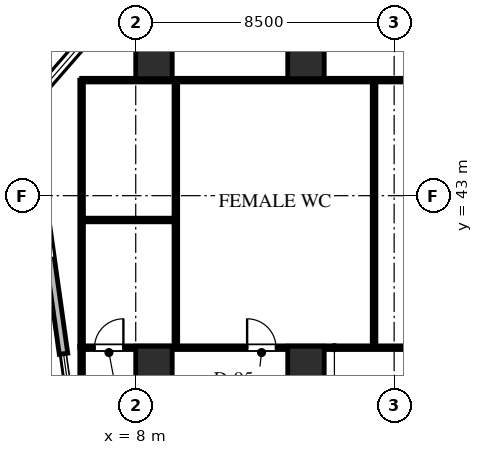
"""IFC4 building model, lengths in metres.
Left out: names, types, materials, properties, quantities, classifications, styles, units other than length and angle.
Written with IfcOpenShell. Run it as: python <this file> out.ifc"""

import sys

from ifc_helpers import new_model, si_unit, direction, frame, frame_2d, origin, origin_2d, place, context, subcontext, project, spatial, rectangle, extrude, element, fill, save


model = new_model("IFC4")
c1 = context("Model", 3, precision=1e-05, world=origin(), true_north=direction((0.0, 1.0)))
c2 = subcontext(c1, "Body", "Model", "MODEL_VIEW")
j1 = project(units=[si_unit("LENGTHUNIT", "METRE"), si_unit("PLANEANGLEUNIT", "RADIAN")], contexts=[c1])
p1 = place(None, origin())
s1 = spatial("IfcSite", under=j1, at=p1, CompositionType="ELEMENT")
p2 = place(p1, origin())
s2 = spatial("IfcBuilding", under=s1, at=p2, CompositionType="ELEMENT")
p3 = place(p2, frame((0.0, 0.0, 37.5)))
s3 = spatial("IfcBuildingStorey", under=s2, at=p3, CompositionType="ELEMENT", Elevation=37.5)
for number, where, z_axis, x_axis in (
    (1, (13.6, 37.35, 0.0), (0.0, 0.0, 1.0), (1.0, 0.0, 0.0)),
    (2, (13.6, 47.55, 0.0), (0.0, 0.0, 1.0), (1.0, 0.0, 0.0)),
    (3, (8.6, 37.35, 0.0), (0.0, 0.0, 1.0), (1.0, 0.0, 0.0)),
    (4, (8.6, 47.55, 0.0), (0.0, 0.0, 1.0), (1.0, 0.0, 0.0)),
):
    element("IfcColumn", number, at=place(p3, frame(where, z_axis=z_axis, x_axis=x_axis)), inside=s3, PredefinedType="COLUMN", context=c2, shape_type="SweptSolid", body=[
        extrude(rectangle(XDim=1.2, YDim=1.4, at=origin_2d()), origin(), (0.0, 0.0, 1.0), 4.0),
    ])
p4 = place(p3, frame((5.625, 37.8, 0.0), z_axis=(0.0, 0.0, 1.0), x_axis=(-0.139180172484, 0.990267074878, 0.0)))
e5 = element("IfcWall", 5, at=p4, inside=s3, PredefinedType="STANDARD", context=c2, shape_type="SweptSolid", body=[
    extrude(rectangle(XDim=8.267, YDim=0.28, at=frame_2d((4.134, 0.0))), origin(), (0.0, 0.0, 1.0), 3.74),
])
p5 = place(p4, frame((3.173, 0.0, 0.65)))
e6 = element("IfcOpeningElement", 6, at=p5, cuts=e5, PredefinedType="OPENING", context=c2, shape_type="SweptSolid", body=[
    extrude(rectangle(XDim=1.8, YDim=2.1, at=frame_2d((0.9, 1.05))), frame((0.0, 0.15, 0.0), z_axis=(0.0, -1.0, 0.0), x_axis=(1.0, 0.0, 0.0)), (0.0, 0.0, 1.0), 0.3),
])
p6 = place(p3, frame((4.474, 45.987, 0.0), z_axis=(0.0, 0.0, 1.0), x_axis=(0.656070053895, 0.754699996278, 0.0)))
e7 = element("IfcWall", 7, at=p6, inside=s3, PredefinedType="STANDARD", context=c2, shape_type="SweptSolid", body=[
    extrude(rectangle(XDim=3.171, YDim=0.28, at=frame_2d((1.585, 0.0))), origin(), (0.0, 0.0, 1.0), 3.74),
])
p7 = place(p6, frame((0.667, 0.0, 0.65)))
e8 = element("IfcOpeningElement", 8, at=p7, cuts=e7, PredefinedType="OPENING", context=c2, shape_type="SweptSolid", body=[
    extrude(rectangle(XDim=1.8, YDim=2.1, at=frame_2d((0.9, 1.05))), frame((0.0, 0.15, 0.0), z_axis=(0.0, -1.0, 0.0), x_axis=(1.0, 0.0, 0.0)), (0.0, 0.0, 1.0), 0.3),
])
p8 = place(p3, frame((6.22, 38.0, 0.0), z_axis=(0.0, 0.0, 1.0), x_axis=(1.0, 0.0, 0.0)))
e9 = element("IfcWall", 9, at=p8, inside=s3, PredefinedType="PARTITIONING", context=c2, shape_type="SweptSolid", body=[
    extrude(rectangle(XDim=16.63, YDim=0.12, at=frame_2d((8.315, 0.0))), origin(), (0.0, 0.0, 1.0), 2.813),
])
p9 = place(p8, frame((0.424, 0.0, 0.0)))
e10 = element("IfcOpeningElement", 10, at=p9, cuts=e9, PredefinedType="OPENING", context=c2, shape_type="SweptSolid", body=[
    extrude(rectangle(XDim=0.95, YDim=2.15, at=frame_2d((0.475, 1.075))), frame((0.0, 0.07, 0.0), z_axis=(0.0, -1.0, 0.0), x_axis=(1.0, 0.0, 0.0)), (0.0, 0.0, 1.0), 0.14),
])
p10 = place(p8, frame((5.444, 0.0, 0.0)))
e11 = element("IfcOpeningElement", 11, at=p10, cuts=e9, PredefinedType="OPENING", context=c2, shape_type="SweptSolid", body=[
    extrude(rectangle(XDim=0.95, YDim=2.15, at=frame_2d((0.475, 1.075))), frame((0.0, 0.07, 0.0), z_axis=(0.0, -1.0, 0.0), x_axis=(1.0, 0.0, 0.0)), (0.0, 0.0, 1.0), 0.14),
])
p11 = place(p8, frame((13.344, 0.0, 0.0)))
e12 = element("IfcOpeningElement", 12, at=p11, cuts=e9, PredefinedType="OPENING", context=c2, shape_type="SweptSolid", body=[
    extrude(rectangle(XDim=0.95, YDim=2.15, at=frame_2d((0.475, 1.075))), frame((0.0, 0.07, 0.0), z_axis=(0.0, -1.0, 0.0), x_axis=(1.0, 0.0, 0.0)), (0.0, 0.0, 1.0), 0.14),
])
p12 = place(p3, frame((6.22, 38.0, 0.0), z_axis=(0.0, 0.0, 1.0), x_axis=(0.0, 1.0, 0.0)))
e13 = element("IfcWall", 13, at=p12, inside=s3, PredefinedType="PARTITIONING", context=c2, shape_type="SweptSolid", body=[
    extrude(rectangle(XDim=8.8, YDim=0.12, at=frame_2d((4.4, 0.0))), origin(), (0.0, 0.0, 1.0), 3.74),
])
p13 = place(p3, frame((6.22, 46.8, 0.0), z_axis=(0.0, 0.0, 1.0), x_axis=(1.0, 0.0, 0.0)))
e14 = element("IfcWall", 14, at=p13, inside=s3, PredefinedType="PARTITIONING", context=c2, shape_type="SweptSolid", body=[
    extrude(rectangle(XDim=16.68, YDim=0.12, at=frame_2d((8.34, 0.0))), origin(), (0.0, 0.0, 1.0), 2.813),
])
for number, where, z_axis, x_axis in (
    (15, (9.32, 38.068, 0.0), (0.0, 0.0, 1.0), (0.0, 1.0, 0.0)),
    (16, (15.84, 38.068, 0.0), (0.0, 0.0, 1.0), (0.0, 1.0, 0.0)),
):
    element("IfcWall", number, at=place(p3, frame(where, z_axis=z_axis, x_axis=x_axis)), inside=s3, PredefinedType="PARTITIONING", context=c2, shape_type="SweptSolid", body=[
        extrude(rectangle(XDim=8.664, YDim=0.12, at=frame_2d((4.332, 0.0))), origin(), (0.0, 0.0, 1.0), 3.74),
    ])
p14 = place(p3, frame((6.288, 42.2, 0.0), z_axis=(0.0, 0.0, 1.0), x_axis=(1.0, 0.0, 0.0)))
e17 = element("IfcWall", 17, at=p14, inside=s3, PredefinedType="PARTITIONING", context=c2, shape_type="SweptSolid", body=[
    extrude(rectangle(XDim=2.964, YDim=0.12, at=frame_2d((1.482, 0.0))), origin(), (0.0, 0.0, 1.0), 2.813),
])
p15 = place(p3, frame((6.22, 34.4, 0.0), z_axis=(0.0, 0.0, 1.0), x_axis=(0.0, 1.0, 0.0)))
e18 = element("IfcWall", 18, at=p15, inside=s3, PredefinedType="PARTITIONING", context=c2, shape_type="SweptSolid", body=[
    extrude(rectangle(XDim=3.65, YDim=0.12, at=frame_2d((1.825, 0.0))), origin(), (0.0, 0.0, 1.0), 3.74),
])
p16 = place(p7, origin())
e19 = element("IfcWindow", 19, at=p16, inside=s3, PartitioningType="SINGLE_PANEL", PredefinedType="WINDOW", context=c2, shape_type="SweptSolid", body=[
    extrude(rectangle(XDim=1.8, YDim=2.1, at=frame_2d((0.9, 1.05))), frame((0.0, 0.03, 0.0), z_axis=(0.0, -1.0, 0.0), x_axis=(1.0, 0.0, 0.0)), (0.0, 0.0, 1.0), 0.06),
])
fill(e8, e19)
p17 = place(p9, origin())
e20 = element("IfcDoor", 20, at=p17, inside=s3, OperationType="SINGLE_SWING_RIGHT", PredefinedType="DOOR", context=c2, shape_type="SweptSolid", body=[
    extrude(rectangle(XDim=0.95, YDim=2.15, at=frame_2d((0.475, 1.075))), frame((0.0, 0.025, 0.0), z_axis=(0.0, -1.0, 0.0), x_axis=(1.0, 0.0, 0.0)), (0.0, 0.0, 1.0), 0.05),
])
fill(e10, e20)
p18 = place(p10, origin())
e21 = element("IfcDoor", 21, at=p18, inside=s3, OperationType="SINGLE_SWING_LEFT", PredefinedType="DOOR", context=c2, shape_type="SweptSolid", body=[
    extrude(rectangle(XDim=0.95, YDim=2.15, at=frame_2d((0.475, 1.075))), frame((0.0, 0.025, 0.0), z_axis=(0.0, -1.0, 0.0), x_axis=(1.0, 0.0, 0.0)), (0.0, 0.0, 1.0), 0.05),
])
fill(e11, e21)
save(model, sys.argv[1])
